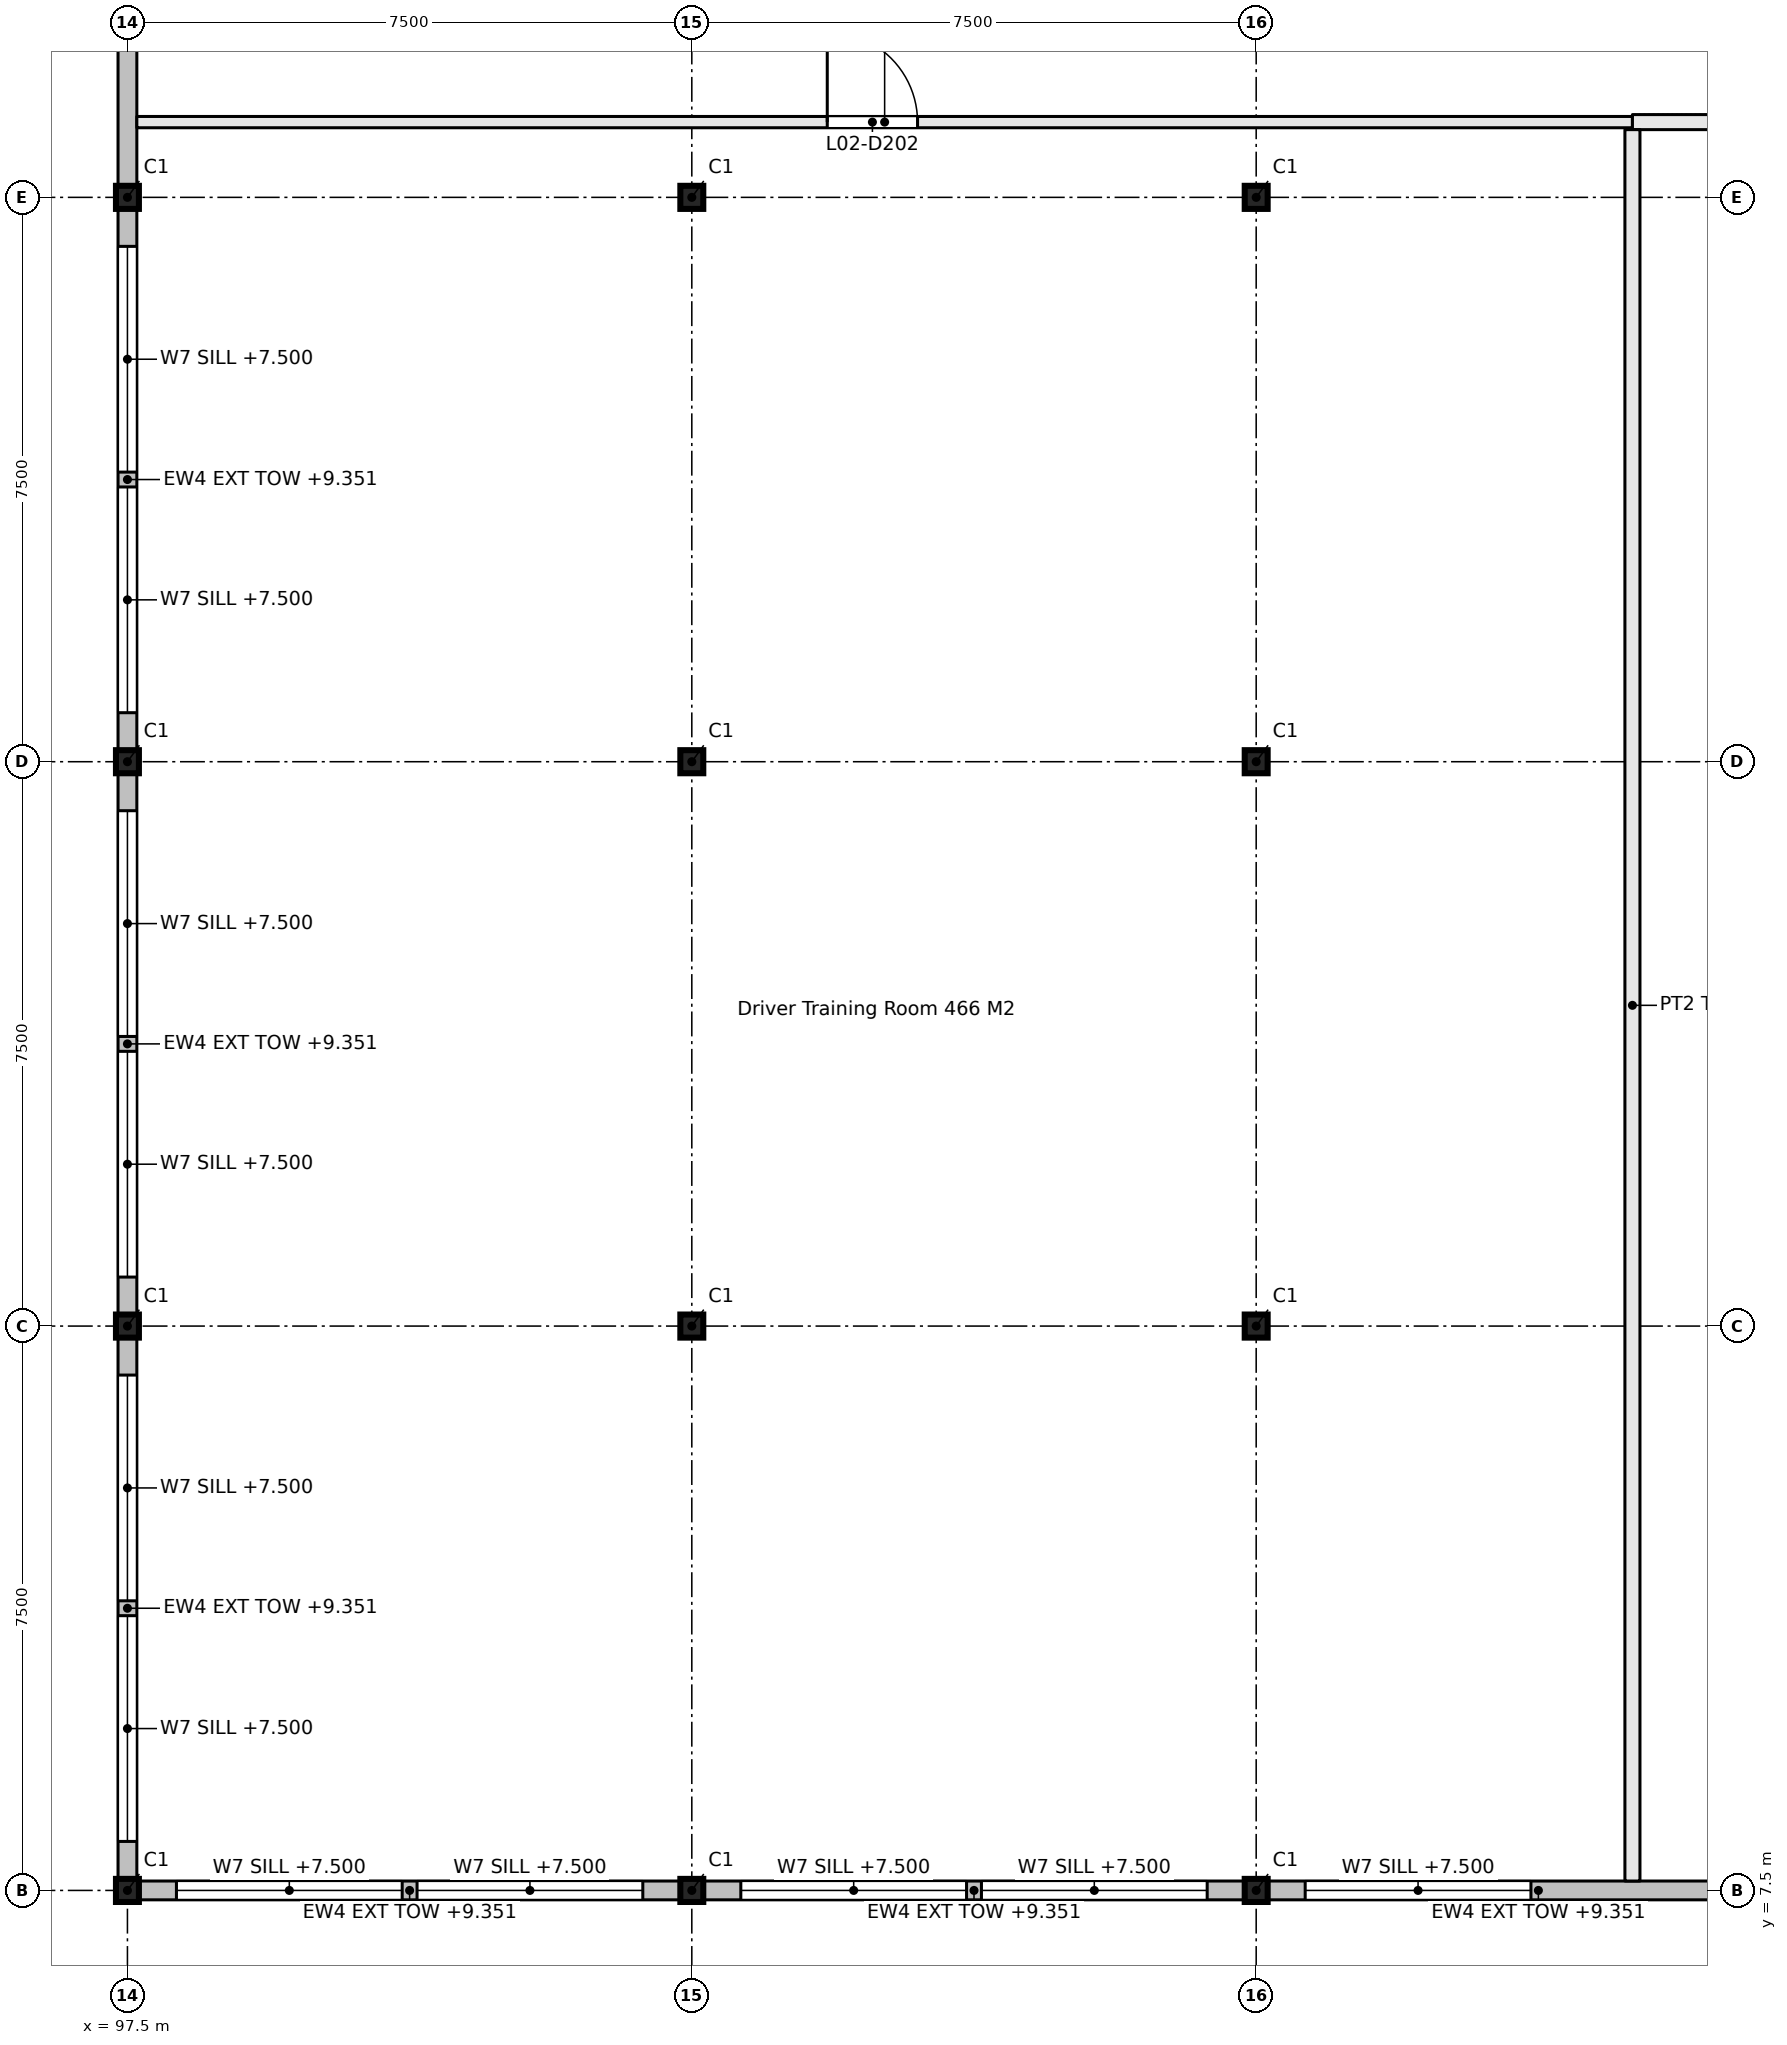
"""IFC4 building model, lengths in metres.
Left out: names, types, materials, properties, quantities, classifications, styles, units other than length and angle.
Written with IfcOpenShell. Run it as: python <this file> out.ifc"""

import sys

from ifc_helpers import new_model, si_unit, direction, frame, frame_2d, origin, origin_2d, place, context, subcontext, project, spatial, rectangle, i_section, extrude, element, fill, save


model = new_model("IFC4")
c1 = context("Model", 3, precision=1e-05, world=origin(), true_north=direction((0.0, 1.0)))
c2 = subcontext(c1, "Body", "Model", "MODEL_VIEW")
j1 = project(units=[si_unit("LENGTHUNIT", "METRE"), si_unit("PLANEANGLEUNIT", "RADIAN")], contexts=[c1])
p1 = place(None, origin())
s1 = spatial("IfcSite", under=j1, at=p1, CompositionType="ELEMENT")
p2 = place(p1, origin())
s2 = spatial("IfcBuilding", under=s1, at=p2, CompositionType="ELEMENT")
p3 = place(p2, frame((0.0, 0.0, 6.6)))
s3 = spatial("IfcBuildingStorey", under=s2, at=p3, CompositionType="ELEMENT", Elevation=6.6)
for number, where, z_axis, x_axis in (
    (1, (97.5, 7.5, 0.0), (0.0, 0.0, 1.0), (1.0, 0.0, 0.0)),
    (2, (97.5, 15.0, 0.0), (0.0, 0.0, 1.0), (1.0, 0.0, 0.0)),
    (3, (97.5, 22.5, 0.0), (0.0, 0.0, 1.0), (1.0, 0.0, 0.0)),
    (4, (97.5, 30.0, 0.0), (0.0, 0.0, 1.0), (1.0, 0.0, 0.0)),
    (5, (105.0, 7.5, 0.0), (0.0, 0.0, 1.0), (1.0, 0.0, 0.0)),
    (6, (105.0, 15.0, 0.0), (0.0, 0.0, 1.0), (1.0, 0.0, 0.0)),
    (7, (105.0, 22.5, 0.0), (0.0, 0.0, 1.0), (1.0, 0.0, 0.0)),
    (8, (105.0, 30.0, 0.0), (0.0, 0.0, 1.0), (1.0, 0.0, 0.0)),
    (9, (112.5, 7.5, 0.0), (0.0, 0.0, 1.0), (1.0, 0.0, 0.0)),
    (10, (112.5, 15.0, 0.0), (0.0, 0.0, 1.0), (1.0, 0.0, 0.0)),
    (11, (112.5, 22.5, 0.0), (0.0, 0.0, 1.0), (1.0, 0.0, 0.0)),
    (12, (112.5, 30.0, 0.0), (0.0, 0.0, 1.0), (1.0, 0.0, 0.0)),
):
    element("IfcColumn", number, at=place(p3, frame(where, z_axis=z_axis, x_axis=x_axis)), inside=s3, PredefinedType="COLUMN", context=c2, shape_type="SweptSolid", body=[
        extrude(i_section(OverallWidth=0.305, OverallDepth=0.307, WebThickness=0.01, FlangeThickness=0.015, FilletRadius=0.015, at=origin_2d()), origin(), (0.0, 0.0, 1.0), 3.3),
    ])
p4 = place(p3, frame((97.625, 31.0, 0.0), z_axis=(0.0, 0.0, 1.0), x_axis=(1.0, 0.0, 0.0)))
e13 = element("IfcWall", 13, at=p4, inside=s3, PredefinedType="PARTITIONING", context=c2, shape_type="SweptSolid", body=[
    extrude(rectangle(XDim=19.875, YDim=0.15, at=frame_2d((9.938, 0.0))), origin(), (0.0, 0.0, 1.0), 2.751),
])
p5 = place(p4, frame((9.175, 0.0, 0.0)))
e14 = element("IfcOpeningElement", 14, at=p5, cuts=e13, PredefinedType="OPENING", context=c2, shape_type="SweptSolid", body=[
    extrude(rectangle(XDim=1.2, YDim=2.1, at=frame_2d((0.6, 1.05))), frame((0.0, 0.085, 0.0), z_axis=(0.0, -1.0, 0.0), x_axis=(1.0, 0.0, 0.0)), (0.0, 0.0, 1.0), 0.17),
])
p6 = place(p3, frame((117.5, 31.0, 0.0), z_axis=(0.0, 0.0, 1.0), x_axis=(1.0, 0.0, 0.0)))
e15 = element("IfcWall", 15, at=p6, inside=s3, PredefinedType="PARTITIONING", context=c2, shape_type="SweptSolid", body=[
    extrude(rectangle(XDim=24.875, YDim=0.2, at=frame_2d((12.438, 0.0))), origin(), (0.0, 0.0, 1.0), 2.751),
])
p7 = place(p6, frame((7.05, 0.0, 0.0)))
e16 = element("IfcOpeningElement", 16, at=p7, cuts=e15, PredefinedType="OPENING", context=c2, shape_type="SweptSolid", body=[
    extrude(rectangle(XDim=1.2, YDim=2.1, at=frame_2d((0.6, 1.05))), frame((0.0, 0.11, 0.0), z_axis=(0.0, -1.0, 0.0), x_axis=(1.0, 0.0, 0.0)), (0.0, 0.0, 1.0), 0.22),
])
p8 = place(p6, frame((19.275, 0.0, 0.0)))
e17 = element("IfcOpeningElement", 17, at=p8, cuts=e15, PredefinedType="OPENING", context=c2, shape_type="SweptSolid", body=[
    extrude(rectangle(XDim=1.2, YDim=2.1, at=frame_2d((0.6, 1.05))), frame((0.0, 0.11, 0.0), z_axis=(0.0, -1.0, 0.0), x_axis=(1.0, 0.0, 0.0)), (0.0, 0.0, 1.0), 0.22),
])
p9 = place(p3, frame((117.5, 7.625, 0.0), z_axis=(0.0, 0.0, 1.0), x_axis=(0.0, 1.0, 0.0)))
e18 = element("IfcWall", 18, at=p9, inside=s3, PredefinedType="PARTITIONING", context=c2, shape_type="SweptSolid", body=[
    extrude(rectangle(XDim=23.275, YDim=0.2, at=frame_2d((11.637, 0.0))), origin(), (0.0, 0.0, 1.0), 2.627),
])
p10 = place(p3, frame((97.654, 7.5, 0.0), z_axis=(0.0, 0.0, 1.0), x_axis=(1.0, 0.0, 0.0)))
e19 = element("IfcWall", 19, at=p10, inside=s3, PredefinedType="SOLIDWALL", context=c2, shape_type="SweptSolid", body=[
    extrude(rectangle(XDim=7.193, YDim=0.25, at=frame_2d((3.596, 0.0))), origin(), (0.0, 0.0, 1.0), 2.751),
])
p11 = place(p10, frame((0.498, 0.0, 0.9)))
e20 = element("IfcOpeningElement", 20, at=p11, cuts=e19, PredefinedType="OPENING", context=c2, shape_type="SweptSolid", body=[
    extrude(rectangle(XDim=3.0, YDim=1.5, at=frame_2d((1.5, 0.75))), frame((0.0, 0.135, 0.0), z_axis=(0.0, -1.0, 0.0), x_axis=(1.0, 0.0, 0.0)), (0.0, 0.0, 1.0), 0.27),
])
p12 = place(p10, frame((3.695, 0.0, 0.9)))
e21 = element("IfcOpeningElement", 21, at=p12, cuts=e19, PredefinedType="OPENING", context=c2, shape_type="SweptSolid", body=[
    extrude(rectangle(XDim=3.0, YDim=1.5, at=frame_2d((1.5, 0.75))), frame((0.0, 0.135, 0.0), z_axis=(0.0, -1.0, 0.0), x_axis=(1.0, 0.0, 0.0)), (0.0, 0.0, 1.0), 0.27),
])
p13 = place(p3, frame((105.154, 7.5, 0.0), z_axis=(0.0, 0.0, 1.0), x_axis=(1.0, 0.0, 0.0)))
e22 = element("IfcWall", 22, at=p13, inside=s3, PredefinedType="SOLIDWALL", context=c2, shape_type="SweptSolid", body=[
    extrude(rectangle(XDim=7.193, YDim=0.25, at=frame_2d((3.596, 0.0))), origin(), (0.0, 0.0, 1.0), 2.751),
])
p14 = place(p13, frame((0.498, 0.0, 0.9)))
e23 = element("IfcOpeningElement", 23, at=p14, cuts=e22, PredefinedType="OPENING", context=c2, shape_type="SweptSolid", body=[
    extrude(rectangle(XDim=3.0, YDim=1.5, at=frame_2d((1.5, 0.75))), frame((0.0, 0.135, 0.0), z_axis=(0.0, -1.0, 0.0), x_axis=(1.0, 0.0, 0.0)), (0.0, 0.0, 1.0), 0.27),
])
p15 = place(p13, frame((3.695, 0.0, 0.9)))
e24 = element("IfcOpeningElement", 24, at=p15, cuts=e22, PredefinedType="OPENING", context=c2, shape_type="SweptSolid", body=[
    extrude(rectangle(XDim=3.0, YDim=1.5, at=frame_2d((1.5, 0.75))), frame((0.0, 0.135, 0.0), z_axis=(0.0, -1.0, 0.0), x_axis=(1.0, 0.0, 0.0)), (0.0, 0.0, 1.0), 0.27),
])
p16 = place(p3, frame((112.654, 7.5, 0.0), z_axis=(0.0, 0.0, 1.0), x_axis=(1.0, 0.0, 0.0)))
e25 = element("IfcWall", 25, at=p16, inside=s3, PredefinedType="SOLIDWALL", context=c2, shape_type="SweptSolid", body=[
    extrude(rectangle(XDim=7.193, YDim=0.25, at=frame_2d((3.596, 0.0))), origin(), (0.0, 0.0, 1.0), 2.751),
])
p17 = place(p16, frame((0.498, 0.0, 0.9)))
e26 = element("IfcOpeningElement", 26, at=p17, cuts=e25, PredefinedType="OPENING", context=c2, shape_type="SweptSolid", body=[
    extrude(rectangle(XDim=3.0, YDim=1.5, at=frame_2d((1.5, 0.75))), frame((0.0, 0.135, 0.0), z_axis=(0.0, -1.0, 0.0), x_axis=(1.0, 0.0, 0.0)), (0.0, 0.0, 1.0), 0.27),
])
p18 = place(p3, frame((97.5, 7.654, 0.0), z_axis=(0.0, 0.0, 1.0), x_axis=(0.0, 1.0, 0.0)))
e27 = element("IfcWall", 27, at=p18, inside=s3, PredefinedType="SOLIDWALL", context=c2, shape_type="SweptSolid", body=[
    extrude(rectangle(XDim=7.193, YDim=0.25, at=frame_2d((3.596, 0.0))), origin(), (0.0, 0.0, 1.0), 2.751),
])
p19 = place(p18, frame((0.498, 0.0, 0.9)))
e28 = element("IfcOpeningElement", 28, at=p19, cuts=e27, PredefinedType="OPENING", context=c2, shape_type="SweptSolid", body=[
    extrude(rectangle(XDim=3.0, YDim=1.5, at=frame_2d((1.5, 0.75))), frame((0.0, 0.135, 0.0), z_axis=(0.0, -1.0, 0.0), x_axis=(1.0, 0.0, 0.0)), (0.0, 0.0, 1.0), 0.27),
])
p20 = place(p18, frame((3.695, 0.0, 0.9)))
e29 = element("IfcOpeningElement", 29, at=p20, cuts=e27, PredefinedType="OPENING", context=c2, shape_type="SweptSolid", body=[
    extrude(rectangle(XDim=3.0, YDim=1.5, at=frame_2d((1.5, 0.75))), frame((0.0, 0.135, 0.0), z_axis=(0.0, -1.0, 0.0), x_axis=(1.0, 0.0, 0.0)), (0.0, 0.0, 1.0), 0.27),
])
p21 = place(p3, frame((97.5, 15.154, 0.0), z_axis=(0.0, 0.0, 1.0), x_axis=(0.0, 1.0, 0.0)))
e30 = element("IfcWall", 30, at=p21, inside=s3, PredefinedType="SOLIDWALL", context=c2, shape_type="SweptSolid", body=[
    extrude(rectangle(XDim=7.193, YDim=0.25, at=frame_2d((3.596, 0.0))), origin(), (0.0, 0.0, 1.0), 2.751),
])
p22 = place(p21, frame((0.498, 0.0, 0.9)))
e31 = element("IfcOpeningElement", 31, at=p22, cuts=e30, PredefinedType="OPENING", context=c2, shape_type="SweptSolid", body=[
    extrude(rectangle(XDim=3.0, YDim=1.5, at=frame_2d((1.5, 0.75))), frame((0.0, 0.135, 0.0), z_axis=(0.0, -1.0, 0.0), x_axis=(1.0, 0.0, 0.0)), (0.0, 0.0, 1.0), 0.27),
])
p23 = place(p21, frame((3.695, 0.0, 0.9)))
e32 = element("IfcOpeningElement", 32, at=p23, cuts=e30, PredefinedType="OPENING", context=c2, shape_type="SweptSolid", body=[
    extrude(rectangle(XDim=3.0, YDim=1.5, at=frame_2d((1.5, 0.75))), frame((0.0, 0.135, 0.0), z_axis=(0.0, -1.0, 0.0), x_axis=(1.0, 0.0, 0.0)), (0.0, 0.0, 1.0), 0.27),
])
p24 = place(p3, frame((97.5, 22.654, 0.0), z_axis=(0.0, 0.0, 1.0), x_axis=(0.0, 1.0, 0.0)))
e33 = element("IfcWall", 33, at=p24, inside=s3, PredefinedType="SOLIDWALL", context=c2, shape_type="SweptSolid", body=[
    extrude(rectangle(XDim=7.193, YDim=0.25, at=frame_2d((3.596, 0.0))), origin(), (0.0, 0.0, 1.0), 2.751),
])
p25 = place(p24, frame((0.498, 0.0, 0.9)))
e34 = element("IfcOpeningElement", 34, at=p25, cuts=e33, PredefinedType="OPENING", context=c2, shape_type="SweptSolid", body=[
    extrude(rectangle(XDim=3.0, YDim=1.5, at=frame_2d((1.5, 0.75))), frame((0.0, 0.135, 0.0), z_axis=(0.0, -1.0, 0.0), x_axis=(1.0, 0.0, 0.0)), (0.0, 0.0, 1.0), 0.27),
])
p26 = place(p24, frame((3.695, 0.0, 0.9)))
e35 = element("IfcOpeningElement", 35, at=p26, cuts=e33, PredefinedType="OPENING", context=c2, shape_type="SweptSolid", body=[
    extrude(rectangle(XDim=3.0, YDim=1.5, at=frame_2d((1.5, 0.75))), frame((0.0, 0.135, 0.0), z_axis=(0.0, -1.0, 0.0), x_axis=(1.0, 0.0, 0.0)), (0.0, 0.0, 1.0), 0.27),
])
p27 = place(p3, frame((97.5, 30.154, 0.0), z_axis=(0.0, 0.0, 1.0), x_axis=(0.0, 1.0, 0.0)))
e36 = element("IfcWall", 36, at=p27, inside=s3, PredefinedType="SOLIDWALL", context=c2, shape_type="SweptSolid", body=[
    extrude(rectangle(XDim=7.188, YDim=0.25, at=frame_2d((3.594, 0.0))), origin(), (0.0, 0.0, 1.0), 2.751),
])
p28 = place(p5, origin())
e37 = element("IfcDoor", 37, at=p28, inside=s3, OperationType="DOUBLE_DOOR_SINGLE_SWING", PredefinedType="DOOR", context=c2, shape_type="SweptSolid", body=[
    extrude(rectangle(XDim=1.2, YDim=2.1, at=frame_2d((0.6, 1.05))), frame((0.0, 0.025, 0.0), z_axis=(0.0, -1.0, 0.0), x_axis=(1.0, 0.0, 0.0)), (0.0, 0.0, 1.0), 0.05),
])
fill(e14, e37)
p29 = place(p11, origin())
e38 = element("IfcWindow", 38, at=p29, inside=s3, PartitioningType="TRIPLE_PANEL_VERTICAL", PredefinedType="WINDOW", context=c2, shape_type="SweptSolid", body=[
    extrude(rectangle(XDim=3.0, YDim=1.5, at=frame_2d((1.5, 0.75))), frame((0.0, 0.03, 0.0), z_axis=(0.0, -1.0, 0.0), x_axis=(1.0, 0.0, 0.0)), (0.0, 0.0, 1.0), 0.06),
])
fill(e20, e38)
p30 = place(p12, origin())
e39 = element("IfcWindow", 39, at=p30, inside=s3, PartitioningType="TRIPLE_PANEL_VERTICAL", PredefinedType="WINDOW", context=c2, shape_type="SweptSolid", body=[
    extrude(rectangle(XDim=3.0, YDim=1.5, at=frame_2d((1.5, 0.75))), frame((0.0, 0.03, 0.0), z_axis=(0.0, -1.0, 0.0), x_axis=(1.0, 0.0, 0.0)), (0.0, 0.0, 1.0), 0.06),
])
fill(e21, e39)
p31 = place(p14, origin())
e40 = element("IfcWindow", 40, at=p31, inside=s3, PartitioningType="TRIPLE_PANEL_VERTICAL", PredefinedType="WINDOW", context=c2, shape_type="SweptSolid", body=[
    extrude(rectangle(XDim=3.0, YDim=1.5, at=frame_2d((1.5, 0.75))), frame((0.0, 0.03, 0.0), z_axis=(0.0, -1.0, 0.0), x_axis=(1.0, 0.0, 0.0)), (0.0, 0.0, 1.0), 0.06),
])
fill(e23, e40)
p32 = place(p15, origin())
e41 = element("IfcWindow", 41, at=p32, inside=s3, PartitioningType="TRIPLE_PANEL_VERTICAL", PredefinedType="WINDOW", context=c2, shape_type="SweptSolid", body=[
    extrude(rectangle(XDim=3.0, YDim=1.5, at=frame_2d((1.5, 0.75))), frame((0.0, 0.03, 0.0), z_axis=(0.0, -1.0, 0.0), x_axis=(1.0, 0.0, 0.0)), (0.0, 0.0, 1.0), 0.06),
])
fill(e24, e41)
p33 = place(p17, origin())
e42 = element("IfcWindow", 42, at=p33, inside=s3, PartitioningType="TRIPLE_PANEL_VERTICAL", PredefinedType="WINDOW", context=c2, shape_type="SweptSolid", body=[
    extrude(rectangle(XDim=3.0, YDim=1.5, at=frame_2d((1.5, 0.75))), frame((0.0, 0.03, 0.0), z_axis=(0.0, -1.0, 0.0), x_axis=(1.0, 0.0, 0.0)), (0.0, 0.0, 1.0), 0.06),
])
fill(e26, e42)
p34 = place(p19, origin())
e43 = element("IfcWindow", 43, at=p34, inside=s3, PartitioningType="TRIPLE_PANEL_VERTICAL", PredefinedType="WINDOW", context=c2, shape_type="SweptSolid", body=[
    extrude(rectangle(XDim=3.0, YDim=1.5, at=frame_2d((1.5, 0.75))), frame((0.0, 0.03, 0.0), z_axis=(0.0, -1.0, 0.0), x_axis=(1.0, 0.0, 0.0)), (0.0, 0.0, 1.0), 0.06),
])
fill(e28, e43)
p35 = place(p20, origin())
e44 = element("IfcWindow", 44, at=p35, inside=s3, PartitioningType="TRIPLE_PANEL_VERTICAL", PredefinedType="WINDOW", context=c2, shape_type="SweptSolid", body=[
    extrude(rectangle(XDim=3.0, YDim=1.5, at=frame_2d((1.5, 0.75))), frame((0.0, 0.03, 0.0), z_axis=(0.0, -1.0, 0.0), x_axis=(1.0, 0.0, 0.0)), (0.0, 0.0, 1.0), 0.06),
])
fill(e29, e44)
p36 = place(p22, origin())
e45 = element("IfcWindow", 45, at=p36, inside=s3, PartitioningType="TRIPLE_PANEL_VERTICAL", PredefinedType="WINDOW", context=c2, shape_type="SweptSolid", body=[
    extrude(rectangle(XDim=3.0, YDim=1.5, at=frame_2d((1.5, 0.75))), frame((0.0, 0.03, 0.0), z_axis=(0.0, -1.0, 0.0), x_axis=(1.0, 0.0, 0.0)), (0.0, 0.0, 1.0), 0.06),
])
fill(e31, e45)
p37 = place(p23, origin())
e46 = element("IfcWindow", 46, at=p37, inside=s3, PartitioningType="TRIPLE_PANEL_VERTICAL", PredefinedType="WINDOW", context=c2, shape_type="SweptSolid", body=[
    extrude(rectangle(XDim=3.0, YDim=1.5, at=frame_2d((1.5, 0.75))), frame((0.0, 0.03, 0.0), z_axis=(0.0, -1.0, 0.0), x_axis=(1.0, 0.0, 0.0)), (0.0, 0.0, 1.0), 0.06),
])
fill(e32, e46)
p38 = place(p25, origin())
e47 = element("IfcWindow", 47, at=p38, inside=s3, PartitioningType="TRIPLE_PANEL_VERTICAL", PredefinedType="WINDOW", context=c2, shape_type="SweptSolid", body=[
    extrude(rectangle(XDim=3.0, YDim=1.5, at=frame_2d((1.5, 0.75))), frame((0.0, 0.03, 0.0), z_axis=(0.0, -1.0, 0.0), x_axis=(1.0, 0.0, 0.0)), (0.0, 0.0, 1.0), 0.06),
])
fill(e34, e47)
p39 = place(p26, origin())
e48 = element("IfcWindow", 48, at=p39, inside=s3, PartitioningType="TRIPLE_PANEL_VERTICAL", PredefinedType="WINDOW", context=c2, shape_type="SweptSolid", body=[
    extrude(rectangle(XDim=3.0, YDim=1.5, at=frame_2d((1.5, 0.75))), frame((0.0, 0.03, 0.0), z_axis=(0.0, -1.0, 0.0), x_axis=(1.0, 0.0, 0.0)), (0.0, 0.0, 1.0), 0.06),
])
fill(e35, e48)
save(model, sys.argv[1])
